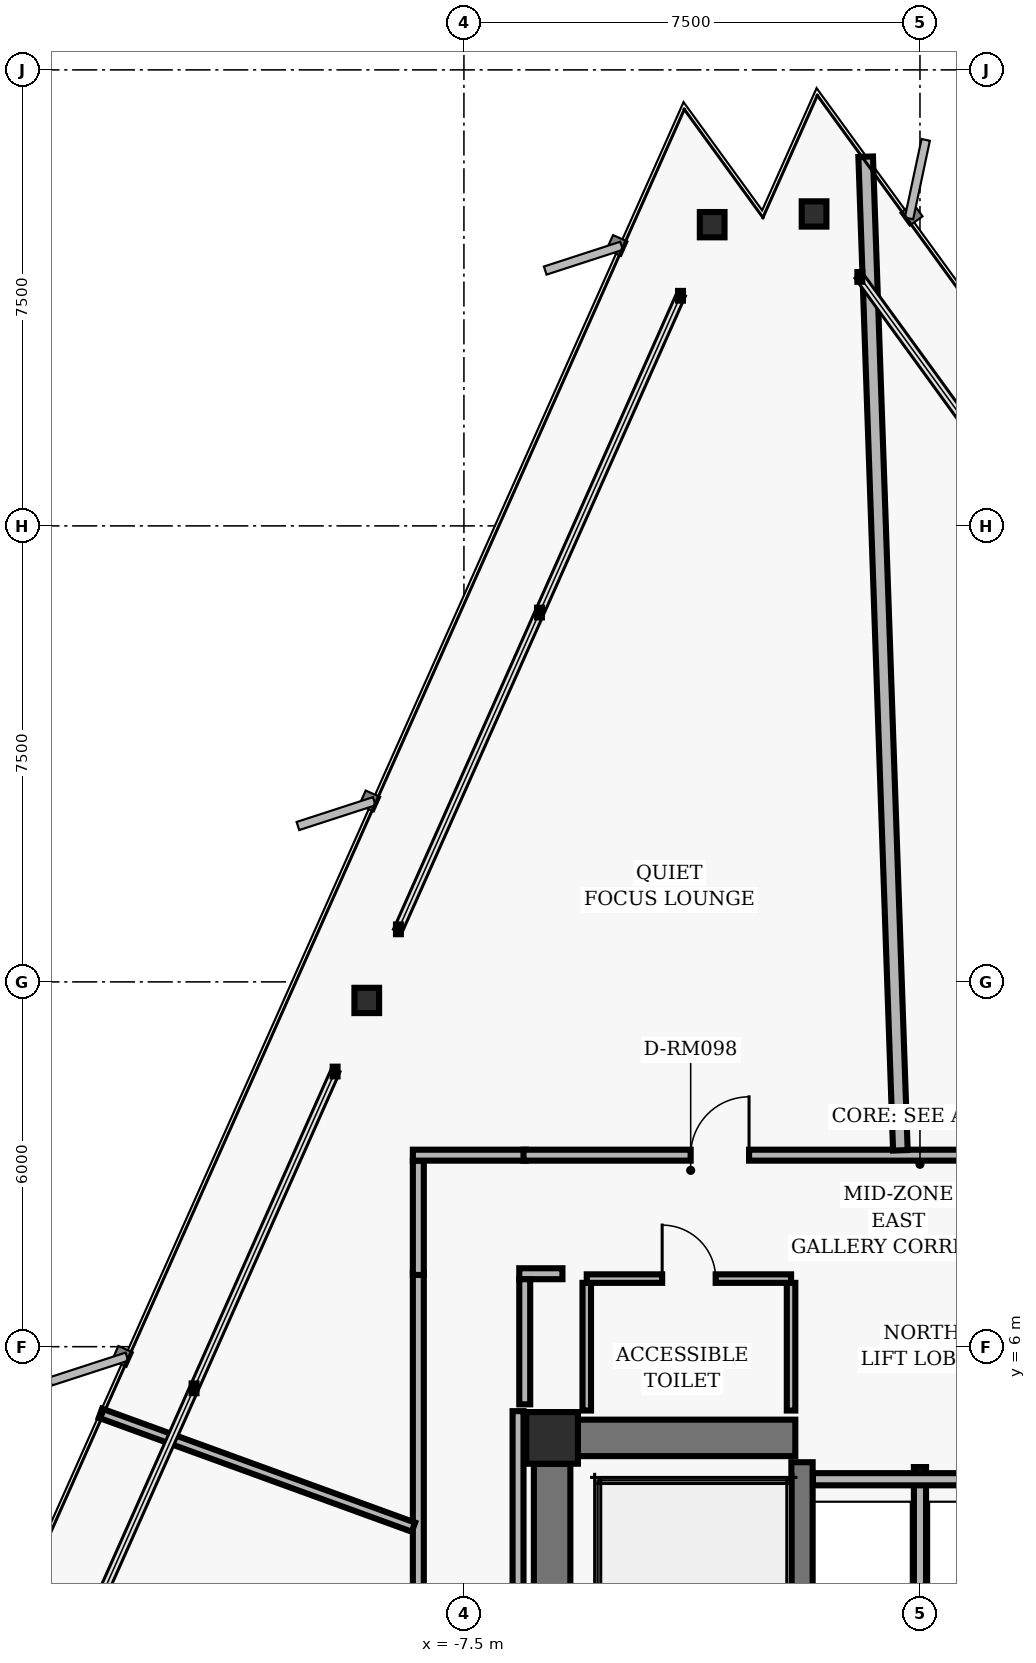
"""IFC4 building model, lengths in metres.
Left out: names, types, materials, properties, quantities, classifications, styles, units other than length and angle.
Written with IfcOpenShell. Run it as: python <this file> out.ifc"""

import sys

from ifc_helpers import new_model, si_unit, direction, frame, frame_2d, origin, origin_2d, place, context, subcontext, project, spatial, rectangle, hollow_rectangle, i_section, extrude, element, fill, save


model = new_model("IFC4")
c1 = context("Model", 3, precision=1e-05, world=origin(), true_north=direction((0.0, 1.0)))
c2 = subcontext(c1, "Body", "Model", "MODEL_VIEW")
j1 = project(units=[si_unit("LENGTHUNIT", "METRE"), si_unit("PLANEANGLEUNIT", "RADIAN")], contexts=[c1])
p1 = place(None, origin())
s1 = spatial("IfcSite", under=j1, at=p1, CompositionType="ELEMENT")
p2 = place(p1, origin())
s2 = spatial("IfcBuilding", under=s1, at=p2, CompositionType="ELEMENT")
p3 = place(p2, frame((0.0, 0.0, 119.84)))
s3 = spatial("IfcBuildingStorey", under=s2, at=p3, CompositionType="ELEMENT", Elevation=119.84)
p4 = place(p3, frame((-6.05, 4.5, 0.0), z_axis=(0.0, 0.0, 1.0), x_axis=(1.0, 0.0, 0.0)))
e1 = element("IfcColumn", 1, at=p4, inside=s3, PredefinedType="COLUMN", context=c2, shape_type="SweptSolid", body=[
    extrude(hollow_rectangle(XDim=0.85, YDim=0.85, WallThickness=0.055, InnerFilletRadius=0.02, OuterFilletRadius=0.04, at=origin_2d()), origin(), (0.0, 0.0, 1.0), 3.04),
])
p5 = place(p3, frame((-6.05, 0.425, 0.0), z_axis=(0.0, 0.0, 1.0), x_axis=(0.0, 1.0, 0.0)))
e2 = element("IfcWall", 2, at=p5, inside=s3, PredefinedType="SHEAR", context=c2, shape_type="SweptSolid", body=[
    extrude(rectangle(XDim=3.65, YDim=0.6, at=frame_2d((1.825, 0.0))), origin(), (0.0, 0.0, 1.0), 2.788),
])
p6 = place(p3, frame((-1.94, -4.1, 0.0), z_axis=(0.0, 0.0, 1.0), x_axis=(0.0, 1.0, 0.0)))
e3 = element("IfcWall", 3, at=p6, inside=s3, PredefinedType="SHEAR", context=c2, shape_type="SweptSolid", body=[
    extrude(rectangle(XDim=8.2, YDim=0.35, at=frame_2d((4.1, 0.0))), origin(), (0.0, 0.0, 1.0), 2.788),
])
p7 = place(p3, frame((-5.625, 4.5, 0.0), z_axis=(0.0, 0.0, 1.0), x_axis=(1.0, 0.0, 0.0)))
e4 = element("IfcWall", 4, at=p7, inside=s3, PredefinedType="SHEAR", context=c2, shape_type="SweptSolid", body=[
    extrude(rectangle(XDim=3.575, YDim=0.6, at=frame_2d((1.788, 0.0))), origin(), (0.0, 0.0, 1.0), 2.788),
])
for number, where, z_axis, x_axis in (
    (5, (-1.742, 24.63, 0.0), (0.0, 0.0, 1.0), (1.0, 0.0, 0.0)),
    (6, (-3.417, 24.454, 0.0), (0.0, 0.0, 1.0), (1.0, 0.0, 0.0)),
    (7, (-9.098, 11.695, 0.0), (0.0, 0.0, 1.0), (1.0, 0.0, 0.0)),
):
    element("IfcColumn", number, at=place(p3, frame(where, z_axis=z_axis, x_axis=x_axis)), inside=s3, PredefinedType="COLUMN", context=c2, shape_type="SweptSolid", body=[
        extrude(i_section(OverallWidth=0.406, OverallDepth=0.416, WebThickness=0.03, FlangeThickness=0.048, FilletRadius=0.02, at=origin_2d()), origin(), (0.0, 0.0, 1.0), 3.04),
    ])
p8 = place(p3, frame((0.0, 1.25, 0.0), z_axis=(0.0, 0.0, 1.0), x_axis=(0.0, 1.0, 0.0)))
e8 = element("IfcWall", 8, at=p8, inside=s3, PredefinedType="PARTITIONING", context=c2, shape_type="SweptSolid", body=[
    extrude(rectangle(XDim=2.77, YDim=0.2, at=frame_2d((1.385, 0.0))), origin(), (0.0, 0.0, 1.0), 2.763),
])
p9 = place(p3, frame((-1.76, 3.82, 0.0), z_axis=(0.0, 0.0, 1.0), x_axis=(1.0, 0.0, 0.0)))
e9 = element("IfcWall", 9, at=p9, inside=s3, PredefinedType="PARTITIONING", context=c2, shape_type="SweptSolid", body=[
    extrude(rectangle(XDim=3.52, YDim=0.2, at=frame_2d((1.76, 0.0))), origin(), (0.0, 0.0, 1.0), 2.763),
])
for number, where, z_axis, x_axis in (
    (10, (-5.48, 4.95, 0.0), (0.0, 0.0, 1.0), (0.0, 1.0, 0.0)),
    (11, (-2.12, 4.95, 0.0), (0.0, 0.0, 1.0), (0.0, 1.0, 0.0)),
):
    element("IfcWall", number, at=place(p3, frame(where, z_axis=z_axis, x_axis=x_axis)), inside=s3, PredefinedType="PARTITIONING", context=c2, shape_type="SweptSolid", body=[
        extrude(rectangle(XDim=2.1, YDim=0.14, at=frame_2d((1.05, 0.0))), origin(), (0.0, 0.0, 1.0), 2.763),
    ])
p10 = place(p3, frame((-5.48, 7.12, 0.0), z_axis=(0.0, 0.0, 1.0), x_axis=(1.0, 0.0, 0.0)))
e12 = element("IfcWall", 12, at=p10, inside=s3, PredefinedType="PARTITIONING", context=c2, shape_type="SweptSolid", body=[
    extrude(rectangle(XDim=3.36, YDim=0.14, at=frame_2d((1.68, 0.0))), origin(), (0.0, 0.0, 1.0), 2.763),
])
p11 = place(p10, frame((1.24, 0.0, 0.0)))
e13 = element("IfcOpeningElement", 13, at=p11, cuts=e12, PredefinedType="OPENING", context=c2, shape_type="SweptSolid", body=[
    extrude(rectangle(XDim=0.88, YDim=2.02, at=frame_2d((0.44, 1.01))), frame((0.0, 0.08, 0.0), z_axis=(0.0, -1.0, 0.0), x_axis=(1.0, 0.0, 0.0)), (0.0, 0.0, 1.0), 0.16),
])
p12 = place(p3, frame((-8.25, -7.22, 0.0), z_axis=(0.0, 0.0, 1.0), x_axis=(0.0, 1.0, 0.0)))
e14 = element("IfcWall", 14, at=p12, inside=s3, PredefinedType="PARTITIONING", context=c2, shape_type="SweptSolid", body=[
    extrude(rectangle(XDim=14.44, YDim=0.18, at=frame_2d((7.22, 0.0))), origin(), (0.0, 0.0, 1.0), 2.33),
])
p13 = place(p12, frame((4.775, 0.0, 0.0)))
e15 = element("IfcOpeningElement", 15, at=p13, cuts=e14, PredefinedType="OPENING", context=c2, shape_type="SweptSolid", body=[
    extrude(rectangle(XDim=0.96, YDim=2.02, at=frame_2d((0.48, 1.01))), frame((0.0, 0.1, 0.0), z_axis=(0.0, -1.0, 0.0), x_axis=(1.0, 0.0, 0.0)), (0.0, 0.0, 1.0), 0.2),
])
p14 = place(p3, frame((-8.25, 7.18, 0.0), z_axis=(0.0, 0.0, 1.0), x_axis=(0.0, 1.0, 0.0)))
e16 = element("IfcWall", 16, at=p14, inside=s3, PredefinedType="PARTITIONING", context=c2, shape_type="SweptSolid", body=[
    extrude(rectangle(XDim=1.88, YDim=0.18, at=frame_2d((0.94, 0.0))), origin(), (0.0, 0.0, 1.0), 2.763),
])
p15 = place(p3, frame((-8.34, 9.15, 0.0), z_axis=(0.0, 0.0, 1.0), x_axis=(1.0, 0.0, 0.0)))
e17 = element("IfcWall", 17, at=p15, inside=s3, PredefinedType="PARTITIONING", context=c2, shape_type="SweptSolid", body=[
    extrude(rectangle(XDim=1.86, YDim=0.18, at=frame_2d((0.93, 0.0))), origin(), (0.0, 0.0, 1.0), 2.763),
])
p16 = place(p3, frame((-6.52, 9.15, 0.0), z_axis=(0.0, 0.0, 1.0), x_axis=(1.0, 0.0, 0.0)))
e18 = element("IfcWall", 18, at=p16, inside=s3, PredefinedType="PARTITIONING", context=c2, shape_type="SweptSolid", body=[
    extrude(rectangle(XDim=16.82, YDim=0.18, at=frame_2d((8.41, 0.0))), origin(), (0.0, 0.0, 1.0), 2.763),
])
p17 = place(p16, frame((10.898, 0.0, 0.0)))
e19 = element("IfcOpeningElement", 19, at=p17, cuts=e18, PredefinedType="OPENING", context=c2, shape_type="SweptSolid", body=[
    extrude(rectangle(XDim=0.96, YDim=2.02, at=frame_2d((0.48, 1.01))), frame((0.0, 0.1, 0.0), z_axis=(0.0, -1.0, 0.0), x_axis=(1.0, 0.0, 0.0)), (0.0, 0.0, 1.0), 0.2),
])
p18 = place(p16, frame((2.749, 0.0, 0.0)))
e20 = element("IfcOpeningElement", 20, at=p18, cuts=e18, PredefinedType="OPENING", context=c2, shape_type="SweptSolid", body=[
    extrude(rectangle(XDim=0.96, YDim=2.02, at=frame_2d((0.48, 1.01))), frame((0.0, 0.1, 0.0), z_axis=(0.0, -1.0, 0.0), x_axis=(1.0, 0.0, 0.0)), (0.0, 0.0, 1.0), 0.2),
])
p19 = place(p3, frame((-5.88, 7.2, 0.0), z_axis=(0.0, 0.0, 1.0), x_axis=(-1.0, 0.0, 0.0)))
e21 = element("IfcWall", 21, at=p19, inside=s3, PredefinedType="PARTITIONING", context=c2, shape_type="SweptSolid", body=[
    extrude(rectangle(XDim=0.71, YDim=0.18, at=frame_2d((0.355, 0.0))), origin(), (0.0, 0.0, 1.0), 2.763),
])
p20 = place(p3, frame((-6.5, 7.11, 0.0), z_axis=(0.0, 0.0, 1.0), x_axis=(0.0, -1.0, 0.0)))
e22 = element("IfcWall", 22, at=p20, inside=s3, PredefinedType="PARTITIONING", context=c2, shape_type="SweptSolid", body=[
    extrude(rectangle(XDim=2.058, YDim=0.18, at=frame_2d((1.029, 0.0))), origin(), (0.0, 0.0, 1.0), 2.763),
])
p21 = place(p3, frame((-6.61, 4.94, 0.0), z_axis=(0.0, 0.0, 1.0), x_axis=(0.0, -1.0, 0.0)))
e23 = element("IfcWall", 23, at=p21, inside=s3, PredefinedType="PARTITIONING", context=c2, shape_type="SweptSolid", body=[
    extrude(rectangle(XDim=9.46, YDim=0.18, at=frame_2d((4.73, 0.0))), origin(), (0.0, 0.0, 1.0), 2.763),
])
p22 = place(p3, frame((-0.322, 9.23, 0.0), z_axis=(0.0, 0.0, 1.0), x_axis=(-0.034907078812, 0.999390562217, 0.0)))
e24 = element("IfcWall", 24, at=p22, inside=s3, PredefinedType="PARTITIONING", context=c2, shape_type="SweptSolid", body=[
    extrude(rectangle(XDim=16.352, YDim=0.24, at=frame_2d((8.176, 0.0))), origin(), (0.0, 0.0, 1.0), 2.132),
])
p23 = place(p3, frame((-8.33, 3.032, 0.0), z_axis=(0.0, 0.0, 1.0), x_axis=(-0.939693198397, 0.342018556347, 0.0)))
e25 = element("IfcWall", 25, at=p23, inside=s3, PredefinedType="PARTITIONING", context=c2, shape_type="SweptSolid", body=[
    extrude(rectangle(XDim=5.479, YDim=0.16, at=frame_2d((2.739, 0.0))), origin(), (0.0, 0.0, 1.0), 2.763),
])
p24 = place(p11, origin())
e26 = element("IfcDoor", 26, at=p24, inside=s3, OperationType="SINGLE_SWING_LEFT", PredefinedType="DOOR", context=c2, shape_type="SweptSolid", body=[
    extrude(rectangle(XDim=0.88, YDim=2.02, at=frame_2d((0.44, 1.01))), frame((0.0, 0.025, 0.0), z_axis=(0.0, -1.0, 0.0), x_axis=(1.0, 0.0, 0.0)), (0.0, 0.0, 1.0), 0.05),
])
fill(e13, e26)
p25 = place(p18, origin())
e27 = element("IfcDoor", 27, at=p25, inside=s3, OperationType="SINGLE_SWING_RIGHT", PredefinedType="DOOR", context=c2, shape_type="SweptSolid", body=[
    extrude(rectangle(XDim=0.96, YDim=2.02, at=frame_2d((0.48, 1.01))), frame((0.0, 0.025, 0.0), z_axis=(0.0, -1.0, 0.0), x_axis=(1.0, 0.0, 0.0)), (0.0, 0.0, 1.0), 0.05),
])
fill(e20, e27)
save(model, sys.argv[1])
